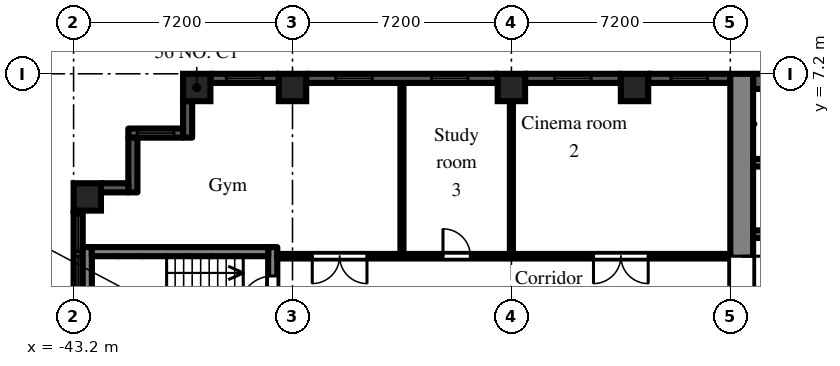
"""IFC4 building model, lengths in metres.
Left out: names, types, materials, properties, quantities, classifications, styles, units other than length and angle.
Written with IfcOpenShell. Run it as: python <this file> out.ifc"""

import sys

from ifc_helpers import new_model, si_unit, direction, frame, frame_2d, origin, origin_2d, place, context, subcontext, project, spatial, rectangle, extrude, element, fill, save


model = new_model("IFC4")
c1 = context("Model", 3, precision=1e-05, world=origin(), true_north=direction((0.0, 1.0)))
c2 = subcontext(c1, "Body", "Model", "MODEL_VIEW")
j1 = project(units=[si_unit("LENGTHUNIT", "METRE"), si_unit("PLANEANGLEUNIT", "RADIAN")], contexts=[c1])
p1 = place(None, origin())
s1 = spatial("IfcSite", under=j1, at=p1, CompositionType="ELEMENT")
p2 = place(p1, origin())
s2 = spatial("IfcBuilding", under=s1, at=p2, CompositionType="ELEMENT")
p3 = place(p2, frame((0.0, 0.0, 11.7)))
s3 = spatial("IfcBuildingStorey", under=s2, at=p3, CompositionType="ELEMENT", Elevation=11.7)
for number, where, z_axis, x_axis in (
    (1, (-42.75, 3.15, 0.0), (0.0, 0.0, 1.0), (1.0, 0.0, 0.0)),
    (2, (-39.15, 6.75, 0.0), (0.0, 0.0, 1.0), (1.0, 0.0, 0.0)),
    (3, (-36.0, 6.75, 0.0), (0.0, 0.0, 1.0), (1.0, 0.0, 0.0)),
    (4, (-28.8, 6.75, 0.0), (0.0, 0.0, 1.0), (1.0, 0.0, 0.0)),
    (5, (-24.75, 6.75, 0.0), (0.0, 0.0, 1.0), (1.0, 0.0, 0.0)),
):
    element("IfcColumn", number, at=place(p3, frame(where, z_axis=z_axis, x_axis=x_axis)), inside=s3, PredefinedType="COLUMN", context=c2, shape_type="SweptSolid", body=[
        extrude(rectangle(XDim=0.9, YDim=0.9, at=origin_2d()), origin(), (0.0, 0.0, 1.0), 3.0),
    ])
p4 = place(p3, frame((-21.6, 7.05, 0.0), z_axis=(0.0, 0.0, 1.0), x_axis=(-1.0, 0.0, 0.0)))
e6 = element("IfcWall", 6, at=p4, inside=s3, PredefinedType="SOLIDWALL", context=c2, shape_type="SweptSolid", body=[
    extrude(rectangle(XDim=2.7, YDim=0.3, at=frame_2d((1.35, 0.0))), origin(), (0.0, 0.0, 1.0), 2.1),
])
p5 = place(p4, frame((0.75, 0.0, 0.2)))
e7 = element("IfcOpeningElement", 7, at=p5, cuts=e6, PredefinedType="OPENING", context=c2, shape_type="SweptSolid", body=[
    extrude(rectangle(XDim=1.2, YDim=1.85, at=frame_2d((0.6, 0.925))), frame((0.0, 0.16, 0.0), z_axis=(0.0, -1.0, 0.0), x_axis=(1.0, 0.0, 0.0)), (0.0, 0.0, 1.0), 0.32),
])
p6 = place(p3, frame((-25.2, 7.05, 0.0), z_axis=(0.0, 0.0, 1.0), x_axis=(-1.0, 0.0, 0.0)))
e8 = element("IfcWall", 8, at=p6, inside=s3, PredefinedType="SOLIDWALL", context=c2, shape_type="SweptSolid", body=[
    extrude(rectangle(XDim=3.15, YDim=0.3, at=frame_2d((1.575, 0.0))), origin(), (0.0, 0.0, 1.0), 2.1),
])
p7 = place(p6, frame((0.975, 0.0, 0.2)))
e9 = element("IfcOpeningElement", 9, at=p7, cuts=e8, PredefinedType="OPENING", context=c2, shape_type="SweptSolid", body=[
    extrude(rectangle(XDim=1.2, YDim=1.85, at=frame_2d((0.6, 0.925))), frame((0.0, 0.16, 0.0), z_axis=(0.0, -1.0, 0.0), x_axis=(1.0, 0.0, 0.0)), (0.0, 0.0, 1.0), 0.32),
])
p8 = place(p3, frame((-29.25, 7.05, 0.0), z_axis=(0.0, 0.0, 1.0), x_axis=(-1.0, 0.0, 0.0)))
e10 = element("IfcWall", 10, at=p8, inside=s3, PredefinedType="SOLIDWALL", context=c2, shape_type="SweptSolid", body=[
    extrude(rectangle(XDim=6.3, YDim=0.3, at=frame_2d((3.15, 0.0))), origin(), (0.0, 0.0, 1.0), 2.1),
])
p9 = place(p8, frame((0.975, 0.0, 0.2)))
e11 = element("IfcOpeningElement", 11, at=p9, cuts=e10, PredefinedType="OPENING", context=c2, shape_type="SweptSolid", body=[
    extrude(rectangle(XDim=1.2, YDim=1.85, at=frame_2d((0.6, 0.925))), frame((0.0, 0.16, 0.0), z_axis=(0.0, -1.0, 0.0), x_axis=(1.0, 0.0, 0.0)), (0.0, 0.0, 1.0), 0.32),
])
p10 = place(p8, frame((4.125, 0.0, 0.2)))
e12 = element("IfcOpeningElement", 12, at=p10, cuts=e10, PredefinedType="OPENING", context=c2, shape_type="SweptSolid", body=[
    extrude(rectangle(XDim=1.2, YDim=1.85, at=frame_2d((0.6, 0.925))), frame((0.0, 0.16, 0.0), z_axis=(0.0, -1.0, 0.0), x_axis=(1.0, 0.0, 0.0)), (0.0, 0.0, 1.0), 0.32),
])
p11 = place(p3, frame((-36.45, 7.05, 0.0), z_axis=(0.0, 0.0, 1.0), x_axis=(-1.0, 0.0, 0.0)))
e13 = element("IfcWall", 13, at=p11, inside=s3, PredefinedType="SOLIDWALL", context=c2, shape_type="SweptSolid", body=[
    extrude(rectangle(XDim=2.25, YDim=0.3, at=frame_2d((1.125, 0.0))), origin(), (0.0, 0.0, 1.0), 2.1),
])
p12 = place(p11, frame((0.525, 0.0, 0.2)))
e14 = element("IfcOpeningElement", 14, at=p12, cuts=e13, PredefinedType="OPENING", context=c2, shape_type="SweptSolid", body=[
    extrude(rectangle(XDim=1.2, YDim=1.85, at=frame_2d((0.6, 0.925))), frame((0.0, 0.16, 0.0), z_axis=(0.0, -1.0, 0.0), x_axis=(1.0, 0.0, 0.0)), (0.0, 0.0, 1.0), 0.32),
])
p13 = place(p3, frame((-39.45, 6.3, 0.0), z_axis=(0.0, 0.0, 1.0), x_axis=(0.0, -1.0, 0.0)))
e15 = element("IfcWall", 15, at=p13, inside=s3, PredefinedType="SOLIDWALL", context=c2, shape_type="SweptSolid", body=[
    extrude(rectangle(XDim=1.2, YDim=0.3, at=frame_2d((0.6, 0.0))), origin(), (0.0, 0.0, 1.0), 2.575),
])
p14 = place(p3, frame((-39.6, 5.25, 0.0), z_axis=(0.0, 0.0, 1.0), x_axis=(-1.0, 0.0, 0.0)))
e16 = element("IfcWall", 16, at=p14, inside=s3, PredefinedType="SOLIDWALL", context=c2, shape_type="SweptSolid", body=[
    extrude(rectangle(XDim=1.8, YDim=0.3, at=frame_2d((0.9, 0.0))), origin(), (0.0, 0.0, 1.0), 2.575),
])
p15 = place(p14, frame((0.3, 0.0, 0.2)))
e17 = element("IfcOpeningElement", 17, at=p15, cuts=e16, PredefinedType="OPENING", context=c2, shape_type="SweptSolid", body=[
    extrude(rectangle(XDim=1.2, YDim=1.85, at=frame_2d((0.6, 0.925))), frame((0.0, 0.16, 0.0), z_axis=(0.0, -1.0, 0.0), x_axis=(1.0, 0.0, 0.0)), (0.0, 0.0, 1.0), 0.32),
])
p16 = place(p3, frame((-41.25, 5.1, 0.0), z_axis=(0.0, 0.0, 1.0), x_axis=(0.0, -1.0, 0.0)))
e18 = element("IfcWall", 18, at=p16, inside=s3, PredefinedType="SOLIDWALL", context=c2, shape_type="SweptSolid", body=[
    extrude(rectangle(XDim=1.8, YDim=0.3, at=frame_2d((0.9, 0.0))), origin(), (0.0, 0.0, 1.0), 2.575),
])
p17 = place(p3, frame((-41.4, 3.45, 0.0), z_axis=(0.0, 0.0, 1.0), x_axis=(-1.0, 0.0, 0.0)))
e19 = element("IfcWall", 19, at=p17, inside=s3, PredefinedType="SOLIDWALL", context=c2, shape_type="SweptSolid", body=[
    extrude(rectangle(XDim=0.9, YDim=0.3, at=frame_2d((0.45, 0.0))), origin(), (0.0, 0.0, 1.0), 2.575),
])
p18 = place(p3, frame((-43.05, 2.7, 0.0), z_axis=(0.0, 0.0, 1.0), x_axis=(0.0, -1.0, 0.0)))
e20 = element("IfcWall", 20, at=p18, inside=s3, PredefinedType="SOLIDWALL", context=c2, shape_type="SweptSolid", body=[
    extrude(rectangle(XDim=5.4, YDim=0.3, at=frame_2d((2.7, 0.0))), origin(), (0.0, 0.0, 1.0), 2.1),
])
p19 = place(p18, frame((1.5, 0.0, 0.2)))
e21 = element("IfcOpeningElement", 21, at=p19, cuts=e20, PredefinedType="OPENING", context=c2, shape_type="SweptSolid", body=[
    extrude(rectangle(XDim=2.4, YDim=1.85, at=frame_2d((1.2, 0.925))), frame((0.0, 0.16, 0.0), z_axis=(0.0, -1.0, 0.0), x_axis=(1.0, 0.0, 0.0)), (0.0, 0.0, 1.0), 0.32),
])
p20 = place(p18, frame((0.15, 0.0, 0.2)))
e22 = element("IfcOpeningElement", 22, at=p20, cuts=e20, PredefinedType="OPENING", context=c2, shape_type="SweptSolid", body=[
    extrude(rectangle(XDim=1.2, YDim=1.85, at=frame_2d((0.6, 0.925))), frame((0.0, 0.16, 0.0), z_axis=(0.0, -1.0, 0.0), x_axis=(1.0, 0.0, 0.0)), (0.0, 0.0, 1.0), 0.32),
])
p21 = place(p3, frame((-21.225, -7.2, 0.0), z_axis=(0.0, 0.0, 1.0), x_axis=(0.0, 1.0, 0.0)))
e23 = element("IfcWall", 23, at=p21, inside=s3, PredefinedType="SHEAR", context=c2, shape_type="SweptSolid", body=[
    extrude(rectangle(XDim=14.4, YDim=0.75, at=frame_2d((7.2, 0.0))), origin(), (0.0, 0.0, 1.0), 2.575),
])
p22 = place(p21, frame((6.0, 0.0, 0.0)))
e24 = element("IfcOpeningElement", 24, at=p22, cuts=e23, PredefinedType="OPENING", context=c2, shape_type="SweptSolid", body=[
    extrude(rectangle(XDim=2.4, YDim=2.2, at=frame_2d((1.2, 1.1))), frame((0.0, 0.385, 0.0), z_axis=(0.0, -1.0, 0.0), x_axis=(1.0, 0.0, 0.0)), (0.0, 0.0, 1.0), 0.77),
])
p23 = place(p3, frame((-7.9, 6.95, 0.0), z_axis=(0.0, 0.0, 1.0), x_axis=(-1.0, 0.0, 0.0)))
e25 = element("IfcWall", 25, at=p23, inside=s3, PredefinedType="SHEAR", context=c2, shape_type="SweptSolid", body=[
    extrude(rectangle(XDim=12.95, YDim=0.5, at=frame_2d((6.475, 0.0))), origin(), (0.0, 0.0, 1.0), 2.575),
])
p24 = place(p3, frame((-7.9, 1.925, 0.0), z_axis=(0.0, 0.0, 1.0), x_axis=(-1.0, 0.0, 0.0)))
e26 = element("IfcWall", 26, at=p24, inside=s3, PredefinedType="SHEAR", context=c2, shape_type="SweptSolid", body=[
    extrude(rectangle(XDim=12.95, YDim=0.25, at=frame_2d((6.475, 0.0))), origin(), (0.0, 0.0, 1.0), 2.575),
])
p25 = place(p24, frame((0.525, 0.0, 0.0)))
e27 = element("IfcOpeningElement", 27, at=p25, cuts=e26, PredefinedType="OPENING", context=c2, shape_type="SweptSolid", body=[
    extrude(rectangle(XDim=0.9, YDim=2.1, at=frame_2d((0.45, 1.05))), frame((0.0, 0.135, 0.0), z_axis=(0.0, -1.0, 0.0), x_axis=(1.0, 0.0, 0.0)), (0.0, 0.0, 1.0), 0.27),
])
p26 = place(p24, frame((2.625, 0.0, 0.0)))
e28 = element("IfcOpeningElement", 28, at=p26, cuts=e26, PredefinedType="OPENING", context=c2, shape_type="SweptSolid", body=[
    extrude(rectangle(XDim=1.1, YDim=2.1, at=frame_2d((0.55, 1.05))), frame((0.0, 0.135, 0.0), z_axis=(0.0, -1.0, 0.0), x_axis=(1.0, 0.0, 0.0)), (0.0, 0.0, 1.0), 0.27),
])
p27 = place(p24, frame((7.125, 0.0, 0.0)))
e29 = element("IfcOpeningElement", 29, at=p27, cuts=e26, PredefinedType="OPENING", context=c2, shape_type="SweptSolid", body=[
    extrude(rectangle(XDim=0.9, YDim=2.1, at=frame_2d((0.45, 1.05))), frame((0.0, 0.135, 0.0), z_axis=(0.0, -1.0, 0.0), x_axis=(1.0, 0.0, 0.0)), (0.0, 0.0, 1.0), 0.27),
])
p28 = place(p3, frame((-12.3, 4.275, 0.0), z_axis=(0.0, 0.0, 1.0), x_axis=(-1.0, 0.0, 0.0)))
e30 = element("IfcWall", 30, at=p28, inside=s3, PredefinedType="SHEAR", context=c2, shape_type="SweptSolid", body=[
    extrude(rectangle(XDim=8.55, YDim=0.25, at=frame_2d((4.275, 0.0))), origin(), (0.0, 0.0, 1.0), 2.575),
])
p29 = place(p3, frame((-36.65, -1.5, 0.0), z_axis=(0.0, 0.0, 1.0), x_axis=(0.0, 1.0, 0.0)))
e31 = element("IfcWall", 31, at=p29, inside=s3, PredefinedType="SHEAR", context=c2, shape_type="SweptSolid", body=[
    extrude(rectangle(XDim=3.0, YDim=0.3, at=frame_2d((1.5, 0.0))), origin(), (0.0, 0.0, 1.0), 2.575),
])
p30 = place(p29, frame((0.95, 0.0, 0.0)))
e32 = element("IfcOpeningElement", 32, at=p30, cuts=e31, PredefinedType="OPENING", context=c2, shape_type="SweptSolid", body=[
    extrude(rectangle(XDim=1.1, YDim=2.1, at=frame_2d((0.55, 1.05))), frame((0.0, 0.16, 0.0), z_axis=(0.0, -1.0, 0.0), x_axis=(1.0, 0.0, 0.0)), (0.0, 0.0, 1.0), 0.32),
])
p31 = place(p3, frame((-42.75, -1.5, 0.0), z_axis=(0.0, 0.0, 1.0), x_axis=(0.0, 1.0, 0.0)))
e33 = element("IfcWall", 33, at=p31, inside=s3, PredefinedType="SHEAR", context=c2, shape_type="SweptSolid", body=[
    extrude(rectangle(XDim=3.0, YDim=0.3, at=frame_2d((1.5, 0.0))), origin(), (0.0, 0.0, 1.0), 2.575),
])
p32 = place(p3, frame((-36.8, 1.35, 0.0), z_axis=(0.0, 0.0, 1.0), x_axis=(-1.0, 0.0, 0.0)))
e34 = element("IfcWall", 34, at=p32, inside=s3, PredefinedType="SHEAR", context=c2, shape_type="SweptSolid", body=[
    extrude(rectangle(XDim=5.8, YDim=0.3, at=frame_2d((2.9, 0.0))), origin(), (0.0, 0.0, 1.0), 2.575),
])
p33 = place(p3, frame((-36.5, 1.2, 0.0), z_axis=(0.0, 0.0, 1.0), x_axis=(1.0, 0.0, 0.0)))
e35 = element("IfcWall", 35, at=p33, inside=s3, PredefinedType="PARTITIONING", context=c2, shape_type="SweptSolid", body=[
    extrude(rectangle(XDim=14.9, YDim=0.15, at=frame_2d((7.45, 0.0))), origin(), (0.0, 0.0, 1.0), 2.575),
])
p34 = place(p33, frame((10.4, 0.0, 0.0)))
e36 = element("IfcOpeningElement", 36, at=p34, cuts=e35, PredefinedType="OPENING", context=c2, shape_type="SweptSolid", body=[
    extrude(rectangle(XDim=1.8, YDim=2.1, at=frame_2d((0.9, 1.05))), frame((0.0, 0.085, 0.0), z_axis=(0.0, -1.0, 0.0), x_axis=(1.0, 0.0, 0.0)), (0.0, 0.0, 1.0), 0.17),
])
p35 = place(p33, frame((5.45, 0.0, 0.0)))
e37 = element("IfcOpeningElement", 37, at=p35, cuts=e35, PredefinedType="OPENING", context=c2, shape_type="SweptSolid", body=[
    extrude(rectangle(XDim=0.9, YDim=2.1, at=frame_2d((0.45, 1.05))), frame((0.0, 0.085, 0.0), z_axis=(0.0, -1.0, 0.0), x_axis=(1.0, 0.0, 0.0)), (0.0, 0.0, 1.0), 0.17),
])
p36 = place(p33, frame((1.15, 0.0, 0.0)))
e38 = element("IfcOpeningElement", 38, at=p36, cuts=e35, PredefinedType="OPENING", context=c2, shape_type="SweptSolid", body=[
    extrude(rectangle(XDim=1.8, YDim=2.1, at=frame_2d((0.9, 1.05))), frame((0.0, 0.085, 0.0), z_axis=(0.0, -1.0, 0.0), x_axis=(1.0, 0.0, 0.0)), (0.0, 0.0, 1.0), 0.17),
])
for number, where, z_axis, x_axis in (
    (39, (-32.4, 1.275, 0.0), (0.0, 0.0, 1.0), (0.0, 1.0, 0.0)),
    (40, (-28.8, 1.275, 0.0), (0.0, 0.0, 1.0), (0.0, 1.0, 0.0)),
):
    element("IfcWall", number, at=place(p3, frame(where, z_axis=z_axis, x_axis=x_axis)), inside=s3, PredefinedType="PARTITIONING", context=c2, shape_type="SweptSolid", body=[
        extrude(rectangle(XDim=5.625, YDim=0.1, at=frame_2d((2.812, 0.0))), origin(), (0.0, 0.0, 1.0), 2.575),
    ])
p37 = place(p5, origin())
e41 = element("IfcWindow", 41, at=p37, inside=s3, PartitioningType="SINGLE_PANEL", PredefinedType="WINDOW", context=c2, shape_type="SweptSolid", body=[
    extrude(rectangle(XDim=1.2, YDim=1.85, at=frame_2d((0.6, 0.925))), frame((0.0, 0.03, 0.0), z_axis=(0.0, -1.0, 0.0), x_axis=(1.0, 0.0, 0.0)), (0.0, 0.0, 1.0), 0.06),
])
fill(e7, e41)
p38 = place(p7, origin())
e42 = element("IfcWindow", 42, at=p38, inside=s3, PartitioningType="SINGLE_PANEL", PredefinedType="WINDOW", context=c2, shape_type="SweptSolid", body=[
    extrude(rectangle(XDim=1.2, YDim=1.85, at=frame_2d((0.6, 0.925))), frame((0.0, 0.03, 0.0), z_axis=(0.0, -1.0, 0.0), x_axis=(1.0, 0.0, 0.0)), (0.0, 0.0, 1.0), 0.06),
])
fill(e9, e42)
p39 = place(p9, origin())
e43 = element("IfcWindow", 43, at=p39, inside=s3, PartitioningType="SINGLE_PANEL", PredefinedType="WINDOW", context=c2, shape_type="SweptSolid", body=[
    extrude(rectangle(XDim=1.2, YDim=1.85, at=frame_2d((0.6, 0.925))), frame((0.0, 0.03, 0.0), z_axis=(0.0, -1.0, 0.0), x_axis=(1.0, 0.0, 0.0)), (0.0, 0.0, 1.0), 0.06),
])
fill(e11, e43)
p40 = place(p10, origin())
e44 = element("IfcWindow", 44, at=p40, inside=s3, PartitioningType="SINGLE_PANEL", PredefinedType="WINDOW", context=c2, shape_type="SweptSolid", body=[
    extrude(rectangle(XDim=1.2, YDim=1.85, at=frame_2d((0.6, 0.925))), frame((0.0, 0.03, 0.0), z_axis=(0.0, -1.0, 0.0), x_axis=(1.0, 0.0, 0.0)), (0.0, 0.0, 1.0), 0.06),
])
fill(e12, e44)
p41 = place(p12, origin())
e45 = element("IfcWindow", 45, at=p41, inside=s3, PartitioningType="SINGLE_PANEL", PredefinedType="WINDOW", context=c2, shape_type="SweptSolid", body=[
    extrude(rectangle(XDim=1.2, YDim=1.85, at=frame_2d((0.6, 0.925))), frame((0.0, 0.03, 0.0), z_axis=(0.0, -1.0, 0.0), x_axis=(1.0, 0.0, 0.0)), (0.0, 0.0, 1.0), 0.06),
])
fill(e14, e45)
p42 = place(p15, origin())
e46 = element("IfcWindow", 46, at=p42, inside=s3, PartitioningType="SINGLE_PANEL", PredefinedType="WINDOW", context=c2, shape_type="SweptSolid", body=[
    extrude(rectangle(XDim=1.2, YDim=1.85, at=frame_2d((0.6, 0.925))), frame((0.0, 0.03, 0.0), z_axis=(0.0, -1.0, 0.0), x_axis=(1.0, 0.0, 0.0)), (0.0, 0.0, 1.0), 0.06),
])
fill(e17, e46)
p43 = place(p19, origin())
e47 = element("IfcWindow", 47, at=p43, inside=s3, PartitioningType="SINGLE_PANEL", PredefinedType="WINDOW", context=c2, shape_type="SweptSolid", body=[
    extrude(rectangle(XDim=2.4, YDim=1.85, at=frame_2d((1.2, 0.925))), frame((0.0, 0.03, 0.0), z_axis=(0.0, -1.0, 0.0), x_axis=(1.0, 0.0, 0.0)), (0.0, 0.0, 1.0), 0.06),
])
fill(e21, e47)
p44 = place(p20, origin())
e48 = element("IfcWindow", 48, at=p44, inside=s3, PartitioningType="SINGLE_PANEL", PredefinedType="WINDOW", context=c2, shape_type="SweptSolid", body=[
    extrude(rectangle(XDim=1.2, YDim=1.85, at=frame_2d((0.6, 0.925))), frame((0.0, 0.03, 0.0), z_axis=(0.0, -1.0, 0.0), x_axis=(1.0, 0.0, 0.0)), (0.0, 0.0, 1.0), 0.06),
])
fill(e22, e48)
p45 = place(p22, frame((2.4, 0.0, 0.0), z_axis=(0.0, 0.0, 1.0), x_axis=(-1.0, 0.0, 0.0)))
e49 = element("IfcDoor", 49, at=p45, inside=s3, OperationType="DOUBLE_DOOR_DOUBLE_SWING", PredefinedType="DOOR", context=c2, shape_type="SweptSolid", body=[
    extrude(rectangle(XDim=2.4, YDim=2.2, at=frame_2d((1.2, 1.1))), frame((0.0, 0.025, 0.0), z_axis=(0.0, -1.0, 0.0), x_axis=(1.0, 0.0, 0.0)), (0.0, 0.0, 1.0), 0.05),
])
fill(e24, e49)
p46 = place(p30, origin())
e50 = element("IfcDoor", 50, at=p46, inside=s3, OperationType="SINGLE_SWING_LEFT", PredefinedType="DOOR", context=c2, shape_type="SweptSolid", body=[
    extrude(rectangle(XDim=1.1, YDim=2.1, at=frame_2d((0.55, 1.05))), frame((0.0, 0.025, 0.0), z_axis=(0.0, -1.0, 0.0), x_axis=(1.0, 0.0, 0.0)), (0.0, 0.0, 1.0), 0.05),
])
fill(e32, e50)
p47 = place(p34, frame((1.8, 0.0, 0.0), z_axis=(0.0, 0.0, 1.0), x_axis=(-1.0, 0.0, 0.0)))
e51 = element("IfcDoor", 51, at=p47, inside=s3, OperationType="DOUBLE_DOOR_DOUBLE_SWING", PredefinedType="DOOR", context=c2, shape_type="SweptSolid", body=[
    extrude(rectangle(XDim=1.8, YDim=2.1, at=frame_2d((0.9, 1.05))), frame((0.0, 0.025, 0.0), z_axis=(0.0, -1.0, 0.0), x_axis=(1.0, 0.0, 0.0)), (0.0, 0.0, 1.0), 0.05),
])
fill(e36, e51)
p48 = place(p35, origin())
e52 = element("IfcDoor", 52, at=p48, inside=s3, OperationType="SINGLE_SWING_LEFT", PredefinedType="DOOR", context=c2, shape_type="SweptSolid", body=[
    extrude(rectangle(XDim=0.9, YDim=2.1, at=frame_2d((0.45, 1.05))), frame((0.0, 0.025, 0.0), z_axis=(0.0, -1.0, 0.0), x_axis=(1.0, 0.0, 0.0)), (0.0, 0.0, 1.0), 0.05),
])
fill(e37, e52)
p49 = place(p36, frame((1.8, 0.0, 0.0), z_axis=(0.0, 0.0, 1.0), x_axis=(-1.0, 0.0, 0.0)))
e53 = element("IfcDoor", 53, at=p49, inside=s3, OperationType="DOUBLE_DOOR_DOUBLE_SWING", PredefinedType="DOOR", context=c2, shape_type="SweptSolid", body=[
    extrude(rectangle(XDim=1.8, YDim=2.1, at=frame_2d((0.9, 1.05))), frame((0.0, 0.025, 0.0), z_axis=(0.0, -1.0, 0.0), x_axis=(1.0, 0.0, 0.0)), (0.0, 0.0, 1.0), 0.05),
])
fill(e38, e53)
save(model, sys.argv[1])
